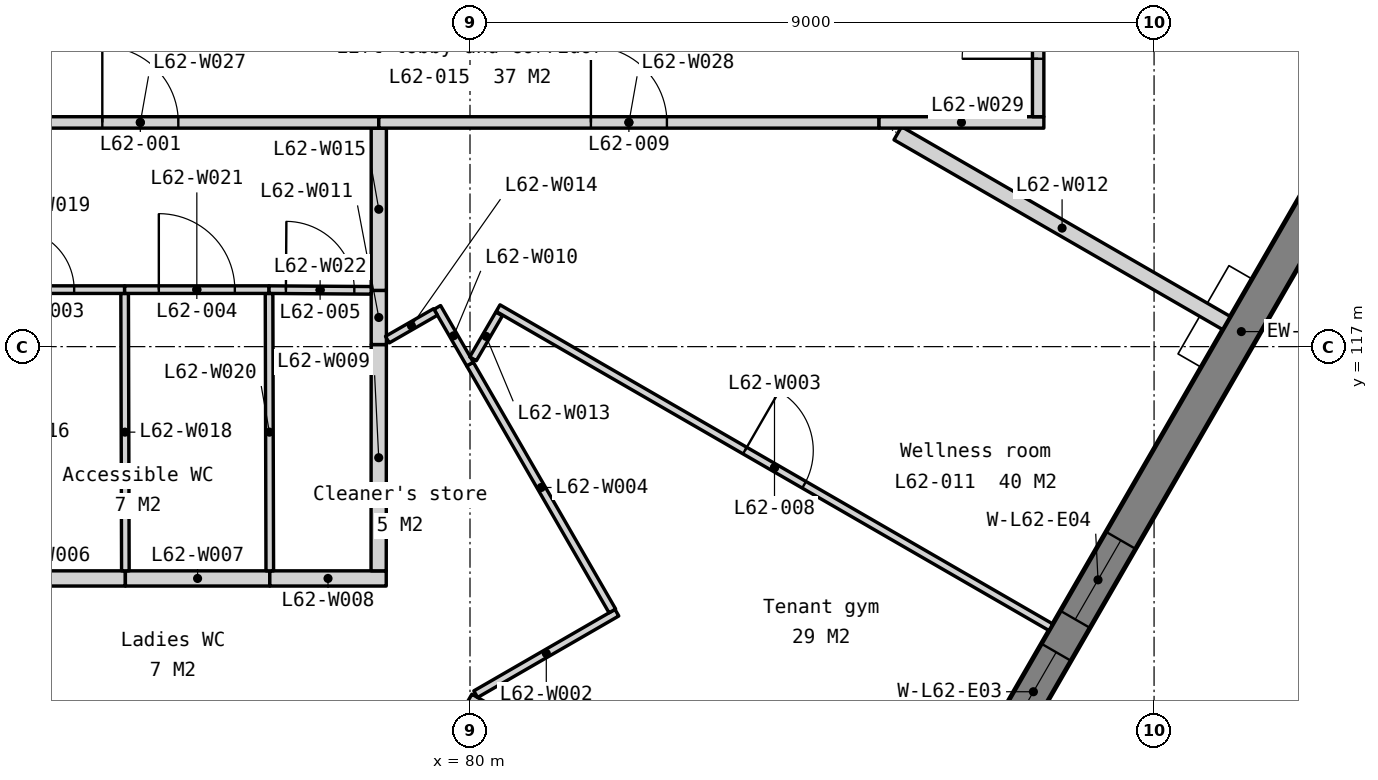
"""IFC4 building model, lengths in metres.
Left out: names, types, materials, properties, quantities, classifications, styles, units other than length and angle.
Written with IfcOpenShell. Run it as: python <this file> out.ifc"""

import sys

from ifc_helpers import new_model, si_unit, direction, frame, frame_2d, origin, place, context, subcontext, project, spatial, polyline, rectangle, outline, extrude, element, fill, save


model = new_model("IFC4")
c1 = context("Model", 3, precision=1e-05, world=origin(), true_north=direction((0.0, 1.0)))
c2 = subcontext(c1, "Body", "Model", "MODEL_VIEW")
j1 = project(units=[si_unit("LENGTHUNIT", "METRE"), si_unit("PLANEANGLEUNIT", "RADIAN")], contexts=[c1])
p1 = place(None, origin())
s1 = spatial("IfcSite", under=j1, at=p1, CompositionType="ELEMENT")
p2 = place(p1, origin())
s2 = spatial("IfcBuilding", under=s1, at=p2, CompositionType="ELEMENT")
p3 = place(p2, frame((0.0, 0.0, 254.3)))
s3 = spatial("IfcBuildingStorey", under=s2, at=p3, CompositionType="ELEMENT", Elevation=254.3)
p4 = place(p3, frame((60.609, 133.207, -0.15), z_axis=(0.0, 0.0, 1.0), x_axis=(0.500002536638, -0.866023939251, 0.0)))
e1 = element("IfcWall", 1, at=p4, inside=s3, PredefinedType="SOLIDWALL", context=c2, shape_type="SweptSolid", body=[
    extrude(outline(polyline([(36.972, 0.0), (36.972, 3.9), (0.0, 3.9), (0.0, 0.0), (36.972, 0.0)])), frame((0.0, 0.225, 0.0), z_axis=(0.0, -1.0, 0.0), x_axis=(1.0, 0.0, 0.0)), (0.0, 0.0, 1.0), 0.45),
])
p5 = place(p4, frame((3.172, 0.0, 0.95)))
e2 = element("IfcOpeningElement", 2, at=p5, cuts=e1, PredefinedType="OPENING", context=c2, shape_type="SweptSolid", body=[
    extrude(rectangle(XDim=1.2, YDim=2.2, at=frame_2d((0.6, 1.1))), frame((0.0, 0.235, 0.0), z_axis=(0.0, -1.0, 0.0), x_axis=(1.0, 0.0, 0.0)), (0.0, 0.0, 1.0), 0.47),
])
p6 = place(p4, frame((4.872, 0.0, 0.95)))
e3 = element("IfcOpeningElement", 3, at=p6, cuts=e1, PredefinedType="OPENING", context=c2, shape_type="SweptSolid", body=[
    extrude(rectangle(XDim=1.2, YDim=2.2, at=frame_2d((0.6, 1.1))), frame((0.0, 0.235, 0.0), z_axis=(0.0, -1.0, 0.0), x_axis=(1.0, 0.0, 0.0)), (0.0, 0.0, 1.0), 0.47),
])
p7 = place(p4, frame((12.415, 0.0, 0.95)))
e4 = element("IfcOpeningElement", 4, at=p7, cuts=e1, PredefinedType="OPENING", context=c2, shape_type="SweptSolid", body=[
    extrude(rectangle(XDim=1.2, YDim=2.2, at=frame_2d((0.6, 1.1))), frame((0.0, 0.235, 0.0), z_axis=(0.0, -1.0, 0.0), x_axis=(1.0, 0.0, 0.0)), (0.0, 0.0, 1.0), 0.47),
])
p8 = place(p4, frame((14.115, 0.0, 0.95)))
e5 = element("IfcOpeningElement", 5, at=p8, cuts=e1, PredefinedType="OPENING", context=c2, shape_type="SweptSolid", body=[
    extrude(rectangle(XDim=1.2, YDim=2.2, at=frame_2d((0.6, 1.1))), frame((0.0, 0.235, 0.0), z_axis=(0.0, -1.0, 0.0), x_axis=(1.0, 0.0, 0.0)), (0.0, 0.0, 1.0), 0.47),
])
p9 = place(p4, frame((21.658, 0.0, 0.95)))
e6 = element("IfcOpeningElement", 6, at=p9, cuts=e1, PredefinedType="OPENING", context=c2, shape_type="SweptSolid", body=[
    extrude(rectangle(XDim=1.2, YDim=2.2, at=frame_2d((0.6, 1.1))), frame((0.0, 0.235, 0.0), z_axis=(0.0, -1.0, 0.0), x_axis=(1.0, 0.0, 0.0)), (0.0, 0.0, 1.0), 0.47),
])
p10 = place(p4, frame((23.358, 0.0, 0.95)))
e7 = element("IfcOpeningElement", 7, at=p10, cuts=e1, PredefinedType="OPENING", context=c2, shape_type="SweptSolid", body=[
    extrude(rectangle(XDim=1.2, YDim=2.2, at=frame_2d((0.6, 1.1))), frame((0.0, 0.235, 0.0), z_axis=(0.0, -1.0, 0.0), x_axis=(1.0, 0.0, 0.0)), (0.0, 0.0, 1.0), 0.47),
])
p11 = place(p4, frame((30.901, 0.0, 0.95)))
e8 = element("IfcOpeningElement", 8, at=p11, cuts=e1, PredefinedType="OPENING", context=c2, shape_type="SweptSolid", body=[
    extrude(rectangle(XDim=1.2, YDim=2.2, at=frame_2d((0.6, 1.1))), frame((0.0, 0.235, 0.0), z_axis=(0.0, -1.0, 0.0), x_axis=(1.0, 0.0, 0.0)), (0.0, 0.0, 1.0), 0.47),
])
p12 = place(p4, frame((32.601, 0.0, 0.95)))
e9 = element("IfcOpeningElement", 9, at=p12, cuts=e1, PredefinedType="OPENING", context=c2, shape_type="SweptSolid", body=[
    extrude(rectangle(XDim=1.2, YDim=2.2, at=frame_2d((0.6, 1.1))), frame((0.0, 0.235, 0.0), z_axis=(0.0, -1.0, 0.0), x_axis=(1.0, 0.0, 0.0)), (0.0, 0.0, 1.0), 0.47),
])
p13 = place(p3, frame((80.905, 101.188, -0.15), z_axis=(0.0, 0.0, 1.0), x_axis=(0.500002536638, 0.866023939251, 0.0)))
e10 = element("IfcWall", 10, at=p13, inside=s3, PredefinedType="SOLIDWALL", context=c2, shape_type="SweptSolid", body=[
    extrude(outline(polyline([(36.972, 0.0), (36.972, 3.9), (0.0, 3.9), (0.0, 0.0), (36.972, 0.0)])), frame((0.0, 0.225, 0.0), z_axis=(0.0, -1.0, 0.0), x_axis=(1.0, 0.0, 0.0)), (0.0, 0.0, 1.0), 0.45),
])
p14 = place(p13, frame((3.172, 0.0, 0.95)))
e11 = element("IfcOpeningElement", 11, at=p14, cuts=e10, PredefinedType="OPENING", context=c2, shape_type="SweptSolid", body=[
    extrude(rectangle(XDim=1.2, YDim=2.2, at=frame_2d((0.6, 1.1))), frame((0.0, 0.235, 0.0), z_axis=(0.0, -1.0, 0.0), x_axis=(1.0, 0.0, 0.0)), (0.0, 0.0, 1.0), 0.47),
])
p15 = place(p13, frame((4.872, 0.0, 0.95)))
e12 = element("IfcOpeningElement", 12, at=p15, cuts=e10, PredefinedType="OPENING", context=c2, shape_type="SweptSolid", body=[
    extrude(rectangle(XDim=1.2, YDim=2.2, at=frame_2d((0.6, 1.1))), frame((0.0, 0.235, 0.0), z_axis=(0.0, -1.0, 0.0), x_axis=(1.0, 0.0, 0.0)), (0.0, 0.0, 1.0), 0.47),
])
p16 = place(p13, frame((12.415, 0.0, 0.95)))
e13 = element("IfcOpeningElement", 13, at=p16, cuts=e10, PredefinedType="OPENING", context=c2, shape_type="SweptSolid", body=[
    extrude(rectangle(XDim=1.2, YDim=2.2, at=frame_2d((0.6, 1.1))), frame((0.0, 0.235, 0.0), z_axis=(0.0, -1.0, 0.0), x_axis=(1.0, 0.0, 0.0)), (0.0, 0.0, 1.0), 0.47),
])
p17 = place(p13, frame((14.115, 0.0, 0.95)))
e14 = element("IfcOpeningElement", 14, at=p17, cuts=e10, PredefinedType="OPENING", context=c2, shape_type="SweptSolid", body=[
    extrude(rectangle(XDim=1.2, YDim=2.2, at=frame_2d((0.6, 1.1))), frame((0.0, 0.235, 0.0), z_axis=(0.0, -1.0, 0.0), x_axis=(1.0, 0.0, 0.0)), (0.0, 0.0, 1.0), 0.47),
])
p18 = place(p13, frame((21.658, 0.0, 0.95)))
e15 = element("IfcOpeningElement", 15, at=p18, cuts=e10, PredefinedType="OPENING", context=c2, shape_type="SweptSolid", body=[
    extrude(rectangle(XDim=1.2, YDim=2.2, at=frame_2d((0.6, 1.1))), frame((0.0, 0.235, 0.0), z_axis=(0.0, -1.0, 0.0), x_axis=(1.0, 0.0, 0.0)), (0.0, 0.0, 1.0), 0.47),
])
p19 = place(p13, frame((23.358, 0.0, 0.95)))
e16 = element("IfcOpeningElement", 16, at=p19, cuts=e10, PredefinedType="OPENING", context=c2, shape_type="SweptSolid", body=[
    extrude(rectangle(XDim=1.2, YDim=2.2, at=frame_2d((0.6, 1.1))), frame((0.0, 0.235, 0.0), z_axis=(0.0, -1.0, 0.0), x_axis=(1.0, 0.0, 0.0)), (0.0, 0.0, 1.0), 0.47),
])
p20 = place(p13, frame((30.901, 0.0, 0.95)))
e17 = element("IfcOpeningElement", 17, at=p20, cuts=e10, PredefinedType="OPENING", context=c2, shape_type="SweptSolid", body=[
    extrude(rectangle(XDim=1.2, YDim=2.2, at=frame_2d((0.6, 1.1))), frame((0.0, 0.235, 0.0), z_axis=(0.0, -1.0, 0.0), x_axis=(1.0, 0.0, 0.0)), (0.0, 0.0, 1.0), 0.47),
])
p21 = place(p13, frame((32.601, 0.0, 0.95)))
e18 = element("IfcOpeningElement", 18, at=p21, cuts=e10, PredefinedType="OPENING", context=c2, shape_type="SweptSolid", body=[
    extrude(rectangle(XDim=1.2, YDim=2.2, at=frame_2d((0.6, 1.1))), frame((0.0, 0.235, 0.0), z_axis=(0.0, -1.0, 0.0), x_axis=(1.0, 0.0, 0.0)), (0.0, 0.0, 1.0), 0.47),
])
p22 = place(p3, frame((80.0, 112.384, 0.0), z_axis=(0.0, 0.0, 1.0), x_axis=(0.866037617598, -0.499978844458, 0.0)))
e19 = element("IfcWall", 19, at=p22, inside=s3, PredefinedType="PARTITIONING", context=c2, shape_type="SweptSolid", body=[
    extrude(rectangle(XDim=6.155, YDim=0.1, at=frame_2d((3.077, 0.0))), origin(), (0.0, 0.0, 1.0), 3.75),
])
p23 = place(p22, frame((2.627, 0.0, 0.0)))
e20 = element("IfcOpeningElement", 20, at=p23, cuts=e19, PredefinedType="OPENING", context=c2, shape_type="SweptSolid", body=[
    extrude(rectangle(XDim=0.9, YDim=2.1, at=frame_2d((0.45, 1.05))), frame((0.0, 0.06, 0.0), z_axis=(0.0, -1.0, 0.0), x_axis=(1.0, 0.0, 0.0)), (0.0, 0.0, 1.0), 0.12),
])
p24 = place(p3, frame((80.075, 112.427, 0.0), z_axis=(0.0, 0.0, 1.0), x_axis=(0.866049104564, 0.499958946799, 0.0)))
e21 = element("IfcWall", 21, at=p24, inside=s3, PredefinedType="PARTITIONING", context=c2, shape_type="SweptSolid", body=[
    extrude(rectangle(XDim=2.145, YDim=0.1, at=frame_2d((1.072, 0.0))), origin(), (0.0, 0.0, 1.0), 3.75),
])
p25 = place(p3, frame((80.37, 117.507, 0.0), z_axis=(0.0, 0.0, 1.0), x_axis=(0.866028733576, -0.499994232587, 0.0)))
e22 = element("IfcWall", 22, at=p25, inside=s3, PredefinedType="PARTITIONING", context=c2, shape_type="SweptSolid", body=[
    extrude(rectangle(XDim=8.398, YDim=0.1, at=frame_2d((4.199, 0.0))), origin(), (0.0, 0.0, 1.0), 3.75),
])
p26 = place(p25, frame((3.749, 0.0, 0.0)))
e23 = element("IfcOpeningElement", 23, at=p26, cuts=e22, PredefinedType="OPENING", context=c2, shape_type="SweptSolid", body=[
    extrude(rectangle(XDim=0.9, YDim=2.1, at=frame_2d((0.45, 1.05))), frame((0.0, 0.06, 0.0), z_axis=(0.0, -1.0, 0.0), x_axis=(1.0, 0.0, 0.0)), (0.0, 0.0, 1.0), 0.12),
])
p27 = place(p3, frame((80.0, 116.771, 0.0), z_axis=(0.0, 0.0, 1.0), x_axis=(0.499564586861, -0.866276643778, 0.0)))
e24 = element("IfcWall", 24, at=p27, inside=s3, PredefinedType="PARTITIONING", context=c2, shape_type="SweptSolid", body=[
    extrude(rectangle(XDim=3.749, YDim=0.1, at=frame_2d((1.875, 0.0))), origin(), (0.0, 0.0, 1.0), 3.75),
])
p28 = place(p3, frame((73.318, 113.95, 0.0), z_axis=(0.0, 0.0, 1.0), x_axis=(1.0, 0.0, 0.0)))
e25 = element("IfcWall", 25, at=p28, inside=s3, PredefinedType="PARTITIONING", context=c2, shape_type="SweptSolid", body=[
    extrude(rectangle(XDim=2.148, YDim=0.2, at=frame_2d((1.074, 0.0))), origin(), (0.0, 0.0, 1.0), 3.75),
])
p29 = place(p3, frame((75.466, 113.95, 0.0), z_axis=(0.0, 0.0, 1.0), x_axis=(1.0, 0.0, 0.0)))
e26 = element("IfcWall", 26, at=p29, inside=s3, PredefinedType="PARTITIONING", context=c2, shape_type="SweptSolid", body=[
    extrude(rectangle(XDim=1.9, YDim=0.2, at=frame_2d((0.95, 0.0))), origin(), (0.0, 0.0, 1.0), 3.75),
])
p30 = place(p3, frame((77.366, 113.95, 0.0), z_axis=(0.0, 0.0, 1.0), x_axis=(1.0, 0.0, 0.0)))
e27 = element("IfcWall", 27, at=p30, inside=s3, PredefinedType="PARTITIONING", context=c2, shape_type="SweptSolid", body=[
    extrude(rectangle(XDim=1.532, YDim=0.2, at=frame_2d((0.766, 0.0))), origin(), (0.0, 0.0, 1.0), 3.75),
])
p31 = place(p3, frame((78.798, 114.05, 0.0), z_axis=(0.0, 0.0, 1.0), x_axis=(0.000656006419, 0.999999784828, 0.0)))
e28 = element("IfcWall", 28, at=p31, inside=s3, PredefinedType="PARTITIONING", context=c2, shape_type="SweptSolid", body=[
    extrude(rectangle(XDim=2.977, YDim=0.2, at=frame_2d((1.489, 0.0))), origin(), (0.0, 0.0, 1.0), 3.75),
])
p32 = place(p3, frame((79.57, 117.516, 0.0), z_axis=(0.0, 0.0, 1.0), x_axis=(0.499861615673, -0.866105285272, 0.0)))
e29 = element("IfcWall", 29, at=p32, inside=s3, PredefinedType="PARTITIONING", context=c2, shape_type="SweptSolid", body=[
    extrude(rectangle(XDim=0.861, YDim=0.1, at=frame_2d((0.43, 0.0))), origin(), (0.0, 0.0, 1.0), 3.75),
])
p33 = place(p3, frame((78.8, 117.027, 0.0), z_axis=(0.0, 0.0, 1.0), x_axis=(0.0, 1.0, 0.0)))
e30 = element("IfcWall", 30, at=p33, inside=s3, PredefinedType="PARTITIONING", context=c2, shape_type="SweptSolid", body=[
    extrude(rectangle(XDim=0.713, YDim=0.2, at=frame_2d((0.356, 0.0))), origin(), (0.0, 0.0, 1.0), 3.75),
])
p34 = place(p3, frame((85.628, 119.807, 0.0), z_axis=(0.0, 0.0, 1.0), x_axis=(0.866031670005, -0.49998914643, 0.0)))
e31 = element("IfcWall", 31, at=p34, inside=s3, PredefinedType="PARTITIONING", context=c2, shape_type="SweptSolid", body=[
    extrude(rectangle(XDim=4.992, YDim=0.2, at=frame_2d((2.496, 0.0))), origin(), (0.0, 0.0, 1.0), 3.75),
])
p35 = place(p3, frame((80.04, 116.84, 0.0), z_axis=(0.0, 0.0, 1.0), x_axis=(0.501867975937, 0.86494423793, 0.0)))
e32 = element("IfcWall", 32, at=p35, inside=s3, PredefinedType="PARTITIONING", context=c2, shape_type="SweptSolid", body=[
    extrude(rectangle(XDim=0.683, YDim=0.1, at=frame_2d((0.341, 0.0))), origin(), (0.0, 0.0, 1.0), 3.75),
])
p36 = place(p3, frame((78.913, 117.092, 0.0), z_axis=(0.0, 0.0, 1.0), x_axis=(0.867068692485, 0.498188601347, 0.0)))
e33 = element("IfcWall", 33, at=p36, inside=s3, PredefinedType="PARTITIONING", context=c2, shape_type="SweptSolid", body=[
    extrude(rectangle(XDim=0.731, YDim=0.1, at=frame_2d((0.365, 0.0))), origin(), (0.0, 0.0, 1.0), 3.75),
])
p37 = place(p3, frame((78.8, 117.74, 0.0), z_axis=(0.0, 0.0, 1.0), x_axis=(0.0, 1.0, 0.0)))
e34 = element("IfcWall", 34, at=p37, inside=s3, PredefinedType="PARTITIONING", context=c2, shape_type="SweptSolid", body=[
    extrude(rectangle(XDim=2.135, YDim=0.2, at=frame_2d((1.067, 0.0))), origin(), (0.0, 0.0, 1.0), 3.75),
])
p38 = place(p3, frame((75.466, 114.05, 0.0), z_axis=(0.0, 0.0, 1.0), x_axis=(-0.002675575707, 0.999996420641, 0.0)))
e35 = element("IfcWall", 35, at=p38, inside=s3, PredefinedType="PARTITIONING", context=c2, shape_type="SweptSolid", body=[
    extrude(rectangle(XDim=3.65, YDim=0.1, at=frame_2d((1.825, 0.0))), origin(), (0.0, 0.0, 1.0), 3.75),
])
p39 = place(p3, frame((73.328, 117.75, 0.0), z_axis=(0.0, 0.0, 1.0), x_axis=(1.0, 0.0, 0.0)))
e36 = element("IfcWall", 36, at=p39, inside=s3, PredefinedType="PARTITIONING", context=c2, shape_type="SweptSolid", body=[
    extrude(rectangle(XDim=2.128, YDim=0.1, at=frame_2d((1.064, 0.0))), origin(), (0.0, 0.0, 1.0), 3.75),
])
p40 = place(p39, frame((0.664, 0.0, 0.0)))
e37 = element("IfcOpeningElement", 37, at=p40, cuts=e36, PredefinedType="OPENING", context=c2, shape_type="SweptSolid", body=[
    extrude(rectangle(XDim=0.8, YDim=2.1, at=frame_2d((0.4, 1.05))), frame((0.0, 0.06, 0.0), z_axis=(0.0, -1.0, 0.0), x_axis=(1.0, 0.0, 0.0)), (0.0, 0.0, 1.0), 0.12),
])
p41 = place(p3, frame((77.366, 114.05, 0.0), z_axis=(0.0, 0.0, 1.0), x_axis=(-0.002608686776, 0.999996597371, 0.0)))
e38 = element("IfcWall", 38, at=p41, inside=s3, PredefinedType="PARTITIONING", context=c2, shape_type="SweptSolid", body=[
    extrude(rectangle(XDim=3.65, YDim=0.1, at=frame_2d((1.825, 0.0))), origin(), (0.0, 0.0, 1.0), 3.75),
])
p42 = place(p3, frame((75.456, 117.75, 0.0), z_axis=(0.0, 0.0, 1.0), x_axis=(1.0, 0.0, 0.0)))
e39 = element("IfcWall", 39, at=p42, inside=s3, PredefinedType="PARTITIONING", context=c2, shape_type="SweptSolid", body=[
    extrude(rectangle(XDim=1.9, YDim=0.1, at=frame_2d((0.95, 0.0))), origin(), (0.0, 0.0, 1.0), 3.75),
])
p43 = place(p42, frame((0.45, 0.0, 0.0)))
e40 = element("IfcOpeningElement", 40, at=p43, cuts=e39, PredefinedType="OPENING", context=c2, shape_type="SweptSolid", body=[
    extrude(rectangle(XDim=1.0, YDim=2.1, at=frame_2d((0.5, 1.05))), frame((0.0, 0.06, 0.0), z_axis=(0.0, -1.0, 0.0), x_axis=(1.0, 0.0, 0.0)), (0.0, 0.0, 1.0), 0.12),
])
p44 = place(p3, frame((77.356, 117.75, 0.0), z_axis=(0.0, 0.0, 1.0), x_axis=(0.99997617642, -0.006902651172, 0.0)))
e41 = element("IfcWall", 41, at=p44, inside=s3, PredefinedType="PARTITIONING", context=c2, shape_type="SweptSolid", body=[
    extrude(rectangle(XDim=1.344, YDim=0.1, at=frame_2d((0.672, 0.0))), origin(), (0.0, 0.0, 1.0), 3.75),
])
p45 = place(p44, frame((0.222, 0.0, 0.0)))
e42 = element("IfcOpeningElement", 42, at=p45, cuts=e41, PredefinedType="OPENING", context=c2, shape_type="SweptSolid", body=[
    extrude(rectangle(XDim=0.9, YDim=2.1, at=frame_2d((0.45, 1.05))), frame((0.0, 0.06, 0.0), z_axis=(0.0, -1.0, 0.0), x_axis=(1.0, 0.0, 0.0)), (0.0, 0.0, 1.0), 0.12),
])
p46 = place(p3, frame((72.525, 119.95, 0.0), z_axis=(0.0, 0.0, 1.0), x_axis=(1.0, 0.0, 0.0)))
e43 = element("IfcWall", 43, at=p46, inside=s3, PredefinedType="PARTITIONING", context=c2, shape_type="SweptSolid", body=[
    extrude(rectangle(XDim=6.275, YDim=0.15, at=frame_2d((3.138, 0.0))), origin(), (0.0, 0.0, 1.0), 3.75),
])
p47 = place(p46, frame((2.637, 0.0, 0.0)))
e44 = element("IfcOpeningElement", 44, at=p47, cuts=e43, PredefinedType="OPENING", context=c2, shape_type="SweptSolid", body=[
    extrude(rectangle(XDim=1.0, YDim=2.1, at=frame_2d((0.5, 1.05))), frame((0.0, 0.085, 0.0), z_axis=(0.0, -1.0, 0.0), x_axis=(1.0, 0.0, 0.0)), (0.0, 0.0, 1.0), 0.17),
])
p48 = place(p3, frame((78.8, 119.95, 0.0), z_axis=(0.0, 0.0, 1.0), x_axis=(1.0, 0.0, 0.0)))
e45 = element("IfcWall", 45, at=p48, inside=s3, PredefinedType="PARTITIONING", context=c2, shape_type="SweptSolid", body=[
    extrude(rectangle(XDim=6.581, YDim=0.15, at=frame_2d((3.291, 0.0))), origin(), (0.0, 0.0, 1.0), 3.75),
])
p49 = place(p48, frame((2.791, 0.0, 0.0)))
e46 = element("IfcOpeningElement", 46, at=p49, cuts=e45, PredefinedType="OPENING", context=c2, shape_type="SweptSolid", body=[
    extrude(rectangle(XDim=1.0, YDim=2.1, at=frame_2d((0.5, 1.05))), frame((0.0, 0.085, 0.0), z_axis=(0.0, -1.0, 0.0), x_axis=(1.0, 0.0, 0.0)), (0.0, 0.0, 1.0), 0.17),
])
p50 = place(p3, frame((85.381, 119.95, 0.0), z_axis=(0.0, 0.0, 1.0), x_axis=(1.0, 0.0, 0.0)))
e47 = element("IfcWall", 47, at=p50, inside=s3, PredefinedType="PARTITIONING", context=c2, shape_type="SweptSolid", body=[
    extrude(rectangle(XDim=2.169, YDim=0.15, at=frame_2d((1.084, 0.0))), origin(), (0.0, 0.0, 1.0), 3.75),
])
p51 = place(p3, frame((87.475, 120.025, 0.0), z_axis=(0.0, 0.0, 1.0), x_axis=(0.0, 1.0, 0.0)))
e48 = element("IfcWall", 48, at=p51, inside=s3, PredefinedType="PARTITIONING", context=c2, shape_type="SweptSolid", body=[
    extrude(rectangle(XDim=2.525, YDim=0.15, at=frame_2d((1.263, 0.0))), origin(), (0.0, 0.0, 1.0), 3.75),
])
p52 = place(p51, frame((0.762, 0.0, 0.0)))
e49 = element("IfcOpeningElement", 49, at=p52, cuts=e48, PredefinedType="OPENING", context=c2, shape_type="SweptSolid", body=[
    extrude(rectangle(XDim=1.0, YDim=2.1, at=frame_2d((0.5, 1.05))), frame((0.0, 0.085, 0.0), z_axis=(0.0, -1.0, 0.0), x_axis=(1.0, 0.0, 0.0)), (0.0, 0.0, 1.0), 0.17),
])
p53 = place(p16, origin())
e50 = element("IfcWindow", 50, at=p53, inside=s3, PartitioningType="SINGLE_PANEL", PredefinedType="WINDOW", context=c2, shape_type="SweptSolid", body=[
    extrude(rectangle(XDim=1.2, YDim=2.2, at=frame_2d((0.6, 1.1))), frame((0.0, 0.03, 0.0), z_axis=(0.0, -1.0, 0.0), x_axis=(1.0, 0.0, 0.0)), (0.0, 0.0, 1.0), 0.06),
])
fill(e13, e50)
p54 = place(p17, origin())
e51 = element("IfcWindow", 51, at=p54, inside=s3, PartitioningType="SINGLE_PANEL", PredefinedType="WINDOW", context=c2, shape_type="SweptSolid", body=[
    extrude(rectangle(XDim=1.2, YDim=2.2, at=frame_2d((0.6, 1.1))), frame((0.0, 0.03, 0.0), z_axis=(0.0, -1.0, 0.0), x_axis=(1.0, 0.0, 0.0)), (0.0, 0.0, 1.0), 0.06),
])
fill(e14, e51)
p55 = place(p47, origin())
e52 = element("IfcDoor", 52, at=p55, inside=s3, OperationType="SINGLE_SWING_LEFT", PredefinedType="DOOR", context=c2, shape_type="SweptSolid", body=[
    extrude(rectangle(XDim=1.0, YDim=2.1, at=frame_2d((0.5, 1.05))), frame((0.0, 0.025, 0.0), z_axis=(0.0, -1.0, 0.0), x_axis=(1.0, 0.0, 0.0)), (0.0, 0.0, 1.0), 0.05),
])
fill(e44, e52)
p56 = place(p40, origin())
e53 = element("IfcDoor", 53, at=p56, inside=s3, OperationType="SINGLE_SWING_LEFT", PredefinedType="DOOR", context=c2, shape_type="SweptSolid", body=[
    extrude(rectangle(XDim=0.8, YDim=2.1, at=frame_2d((0.4, 1.05))), frame((0.0, 0.025, 0.0), z_axis=(0.0, -1.0, 0.0), x_axis=(1.0, 0.0, 0.0)), (0.0, 0.0, 1.0), 0.05),
])
fill(e37, e53)
p57 = place(p43, origin())
e54 = element("IfcDoor", 54, at=p57, inside=s3, OperationType="SINGLE_SWING_LEFT", PredefinedType="DOOR", context=c2, shape_type="SweptSolid", body=[
    extrude(rectangle(XDim=1.0, YDim=2.1, at=frame_2d((0.5, 1.05))), frame((0.0, 0.025, 0.0), z_axis=(0.0, -1.0, 0.0), x_axis=(1.0, 0.0, 0.0)), (0.0, 0.0, 1.0), 0.05),
])
fill(e40, e54)
p58 = place(p45, origin())
e55 = element("IfcDoor", 55, at=p58, inside=s3, OperationType="SINGLE_SWING_LEFT", PredefinedType="DOOR", context=c2, shape_type="SweptSolid", body=[
    extrude(rectangle(XDim=0.9, YDim=2.1, at=frame_2d((0.45, 1.05))), frame((0.0, 0.025, 0.0), z_axis=(0.0, -1.0, 0.0), x_axis=(1.0, 0.0, 0.0)), (0.0, 0.0, 1.0), 0.05),
])
fill(e42, e55)
p59 = place(p26, origin())
e56 = element("IfcDoor", 56, at=p59, inside=s3, OperationType="SINGLE_SWING_LEFT", PredefinedType="DOOR", context=c2, shape_type="SweptSolid", body=[
    extrude(rectangle(XDim=0.9, YDim=2.1, at=frame_2d((0.45, 1.05))), frame((0.0, 0.025, 0.0), z_axis=(0.0, -1.0, 0.0), x_axis=(1.0, 0.0, 0.0)), (0.0, 0.0, 1.0), 0.05),
])
fill(e23, e56)
p60 = place(p49, origin())
e57 = element("IfcDoor", 57, at=p60, inside=s3, OperationType="SINGLE_SWING_LEFT", PredefinedType="DOOR", context=c2, shape_type="SweptSolid", body=[
    extrude(rectangle(XDim=1.0, YDim=2.1, at=frame_2d((0.5, 1.05))), frame((0.0, 0.025, 0.0), z_axis=(0.0, -1.0, 0.0), x_axis=(1.0, 0.0, 0.0)), (0.0, 0.0, 1.0), 0.05),
])
fill(e46, e57)
p61 = place(p52, origin())
e58 = element("IfcDoor", 58, at=p61, inside=s3, OperationType="SINGLE_SWING_LEFT", PredefinedType="DOOR", context=c2, shape_type="SweptSolid", body=[
    extrude(rectangle(XDim=1.0, YDim=2.1, at=frame_2d((0.5, 1.05))), frame((0.0, 0.025, 0.0), z_axis=(0.0, -1.0, 0.0), x_axis=(1.0, 0.0, 0.0)), (0.0, 0.0, 1.0), 0.05),
])
fill(e49, e58)
save(model, sys.argv[1])
